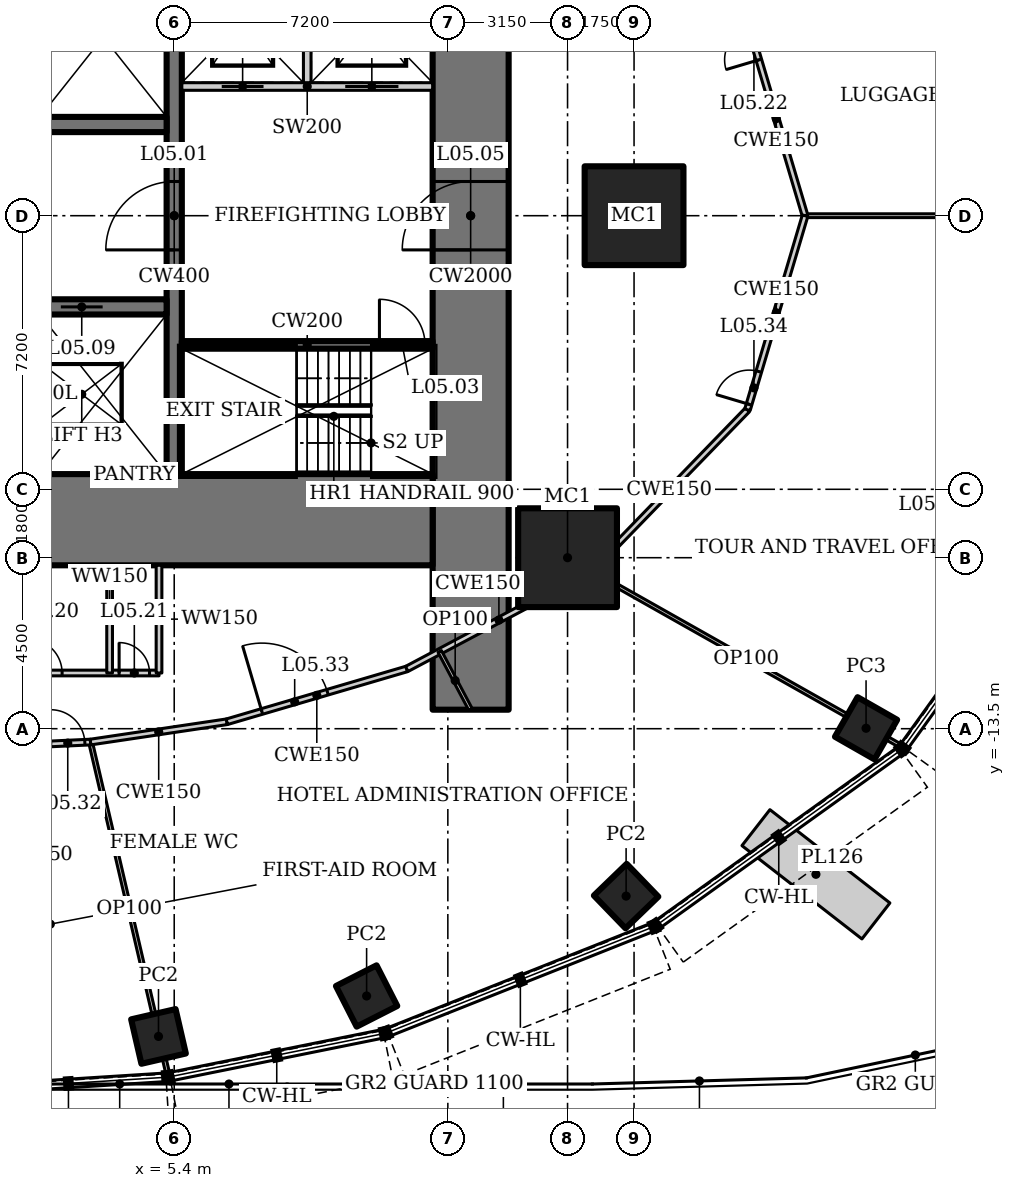
"""IFC4 building model, lengths in metres.
Left out: names, types, materials, properties, quantities, classifications, styles, units other than length and angle.
Written with IfcOpenShell. Run it as: python <this file> out.ifc"""

import sys

from ifc_helpers import new_model, si_unit, direction, frame, frame_2d, origin, origin_2d, place, context, subcontext, project, spatial, rectangle, hollow_rectangle, extrude, element, fill, save


model = new_model("IFC4")
c1 = context("Model", 3, precision=1e-05, world=origin(), true_north=direction((0.0, 1.0)))
c2 = subcontext(c1, "Body", "Model", "MODEL_VIEW")
j1 = project(units=[si_unit("LENGTHUNIT", "METRE"), si_unit("PLANEANGLEUNIT", "RADIAN")], contexts=[c1])
p1 = place(None, origin())
s1 = spatial("IfcSite", under=j1, at=p1, CompositionType="ELEMENT")
p2 = place(p1, origin())
s2 = spatial("IfcBuilding", under=s1, at=p2, CompositionType="ELEMENT")
p3 = place(p2, frame((0.0, 0.0, 32.0)))
s3 = spatial("IfcBuildingStorey", under=s2, at=p3, CompositionType="ELEMENT", Elevation=32.0)
for number, where, z_axis, x_axis in (
    (1, (17.5, 0.0, 0.0), (0.0, 0.0, 1.0), (1.0, 0.0, 0.0)),
    (2, (15.75, -9.0, 0.0), (0.0, 0.0, 1.0), (1.0, 0.0, 0.0)),
):
    element("IfcColumn", number, at=place(p3, frame(where, z_axis=z_axis, x_axis=x_axis)), inside=s3, PredefinedType="COLUMN", context=c2, shape_type="SweptSolid", body=[
        extrude(hollow_rectangle(XDim=2.6, YDim=2.6, WallThickness=0.13, at=origin_2d()), origin(), (0.0, 0.0, 1.0), 5.0),
    ])
for number, where, z_axis, x_axis in (
    (3, (4.986, -21.598, 0.0), (0.0, 0.0, 1.0), (0.974, 0.225, 0.0)),
    (4, (10.463, -20.534, 0.0), (0.0, 0.0, 1.0), (0.891, 0.454, 0.0)),
    (5, (17.291, -17.905, 0.0), (0.0, 0.0, 1.0), (0.719, 0.695, 0.0)),
):
    element("IfcColumn", number, at=place(p3, frame(where, z_axis=z_axis, x_axis=x_axis)), inside=s3, PredefinedType="COLUMN", context=c2, shape_type="SweptSolid", body=[
        extrude(hollow_rectangle(XDim=1.2, YDim=1.2, WallThickness=0.1, at=origin_2d()), origin(), (0.0, 0.0, 1.0), 5.0),
    ])
p4 = place(p3, frame((23.605, -13.489, 0.0), z_axis=(0.0, 0.0, 1.0), x_axis=(0.496139221777, 0.86824298017, 0.0)))
e6 = element("IfcColumn", 6, at=p4, inside=s3, PredefinedType="COLUMN", context=c2, shape_type="SweptSolid", body=[
    extrude(hollow_rectangle(XDim=1.2, YDim=1.2, WallThickness=0.12, at=origin_2d()), origin(), (0.0, 0.0, 1.0), 5.0),
])
p5 = place(p3, frame((13.2, -13.0, 0.0), z_axis=(0.0, 0.0, 1.0), x_axis=(0.0, 1.0, 0.0)))
e7 = element("IfcWall", 7, at=p5, inside=s3, PredefinedType="SHEAR", context=c2, shape_type="SweptSolid", body=[
    extrude(rectangle(XDim=26.0, YDim=2.0, at=frame_2d((13.0, 0.0))), origin(), (0.0, 0.0, 1.0), 5.0),
])
p6 = place(p5, frame((12.1, 0.0, 0.0)))
e8 = element("IfcOpeningElement", 8, at=p6, cuts=e7, PredefinedType="OPENING", context=c2, shape_type="SweptSolid", body=[
    extrude(rectangle(XDim=1.8, YDim=2.1, at=frame_2d((0.9, 1.05))), frame((0.0, 1.01, 0.0), z_axis=(0.0, -1.0, 0.0), x_axis=(1.0, 0.0, 0.0)), (0.0, 0.0, 1.0), 2.02),
])
p7 = place(p3, frame((-12.2, -8.0, 0.0), z_axis=(0.0, 0.0, 1.0), x_axis=(1.0, 0.0, 0.0)))
e9 = element("IfcWall", 9, at=p7, inside=s3, PredefinedType="SHEAR", context=c2, shape_type="SweptSolid", body=[
    extrude(rectangle(XDim=24.4, YDim=2.4, at=frame_2d((12.2, 0.0))), origin(), (0.0, 0.0, 1.0), 5.0),
])
p8 = place(p3, frame((5.4, -6.8, 0.0), z_axis=(0.0, 0.0, 1.0), x_axis=(0.0, 1.0, 0.0)))
e10 = element("IfcWall", 10, at=p8, inside=s3, PredefinedType="SHEAR", context=c2, shape_type="SweptSolid", body=[
    extrude(rectangle(XDim=13.6, YDim=0.4, at=frame_2d((6.8, 0.0))), origin(), (0.0, 0.0, 1.0), 5.0),
])
p9 = place(p8, frame((5.9, 0.0, 0.0)))
e11 = element("IfcOpeningElement", 11, at=p9, cuts=e10, PredefinedType="OPENING", context=c2, shape_type="SweptSolid", body=[
    extrude(rectangle(XDim=1.8, YDim=2.1, at=frame_2d((0.9, 1.05))), frame((0.0, 0.21, 0.0), z_axis=(0.0, -1.0, 0.0), x_axis=(1.0, 0.0, 0.0)), (0.0, 0.0, 1.0), 0.42),
])
p10 = place(p3, frame((-5.2, -2.4, 0.0), z_axis=(0.0, 0.0, 1.0), x_axis=(1.0, 0.0, 0.0)))
e12 = element("IfcWall", 12, at=p10, inside=s3, PredefinedType="SHEAR", context=c2, shape_type="SweptSolid", body=[
    extrude(rectangle(XDim=10.4, YDim=0.4, at=frame_2d((5.2, 0.0))), origin(), (0.0, 0.0, 1.0), 5.0),
])
p11 = place(p10, frame((0.55, 0.0, 0.0)))
e13 = element("IfcOpeningElement", 13, at=p11, cuts=e12, PredefinedType="OPENING", context=c2, shape_type="SweptSolid", body=[
    extrude(rectangle(XDim=1.1, YDim=2.2, at=frame_2d((0.55, 1.1))), frame((0.0, 0.21, 0.0), z_axis=(0.0, -1.0, 0.0), x_axis=(1.0, 0.0, 0.0)), (0.0, 0.0, 1.0), 0.42),
])
p12 = place(p10, frame((4.083, 0.0, 0.0)))
e14 = element("IfcOpeningElement", 14, at=p12, cuts=e12, PredefinedType="OPENING", context=c2, shape_type="SweptSolid", body=[
    extrude(rectangle(XDim=1.1, YDim=2.2, at=frame_2d((0.55, 1.1))), frame((0.0, 0.21, 0.0), z_axis=(0.0, -1.0, 0.0), x_axis=(1.0, 0.0, 0.0)), (0.0, 0.0, 1.0), 0.42),
])
p13 = place(p10, frame((7.617, 0.0, 0.0)))
e15 = element("IfcOpeningElement", 15, at=p13, cuts=e12, PredefinedType="OPENING", context=c2, shape_type="SweptSolid", body=[
    extrude(rectangle(XDim=1.1, YDim=2.2, at=frame_2d((0.55, 1.1))), frame((0.0, 0.21, 0.0), z_axis=(0.0, -1.0, 0.0), x_axis=(1.0, 0.0, 0.0)), (0.0, 0.0, 1.0), 0.42),
])
p14 = place(p3, frame((5.2, 2.4, 0.0), z_axis=(0.0, 0.0, 1.0), x_axis=(-1.0, 0.0, 0.0)))
e16 = element("IfcWall", 16, at=p14, inside=s3, PredefinedType="SHEAR", context=c2, shape_type="SweptSolid", body=[
    extrude(rectangle(XDim=10.4, YDim=0.4, at=frame_2d((5.2, 0.0))), origin(), (0.0, 0.0, 1.0), 5.0),
])
p15 = place(p3, frame((5.6, -3.4, 0.0), z_axis=(0.0, 0.0, 1.0), x_axis=(1.0, 0.0, 0.0)))
e17 = element("IfcWall", 17, at=p15, inside=s3, PredefinedType="SHEAR", context=c2, shape_type="SweptSolid", body=[
    extrude(rectangle(XDim=6.6, YDim=0.2, at=frame_2d((3.3, 0.0))), origin(), (0.0, 0.0, 1.0), 5.0),
])
p16 = place(p15, frame((5.2, 0.0, 0.0)))
e18 = element("IfcOpeningElement", 18, at=p16, cuts=e17, PredefinedType="OPENING", context=c2, shape_type="SweptSolid", body=[
    extrude(rectangle(XDim=1.2, YDim=2.1, at=frame_2d((0.6, 1.05))), frame((0.0, 0.11, 0.0), z_axis=(0.0, -1.0, 0.0), x_axis=(1.0, 0.0, 0.0)), (0.0, 0.0, 1.0), 0.22),
])
p17 = place(p3, frame((12.2, 3.4, 0.0), z_axis=(0.0, 0.0, 1.0), x_axis=(-1.0, 0.0, 0.0)))
e19 = element("IfcWall", 19, at=p17, inside=s3, PredefinedType="SOLIDWALL", context=c2, shape_type="SweptSolid", body=[
    extrude(rectangle(XDim=6.6, YDim=0.2, at=frame_2d((3.3, 0.0))), origin(), (0.0, 0.0, 1.0), 5.0),
])
p18 = place(p17, frame((4.45, 0.0, 0.0)))
e20 = element("IfcOpeningElement", 20, at=p18, cuts=e19, PredefinedType="OPENING", context=c2, shape_type="SweptSolid", body=[
    extrude(rectangle(XDim=1.1, YDim=2.2, at=frame_2d((0.55, 1.1))), frame((0.0, 0.11, 0.0), z_axis=(0.0, -1.0, 0.0), x_axis=(1.0, 0.0, 0.0)), (0.0, 0.0, 1.0), 0.22),
])
p19 = place(p17, frame((0.9, 0.0, 0.0)))
e21 = element("IfcOpeningElement", 21, at=p19, cuts=e19, PredefinedType="OPENING", context=c2, shape_type="SweptSolid", body=[
    extrude(rectangle(XDim=1.4, YDim=2.2, at=frame_2d((0.7, 1.1))), frame((0.0, 0.11, 0.0), z_axis=(0.0, -1.0, 0.0), x_axis=(1.0, 0.0, 0.0)), (0.0, 0.0, 1.0), 0.22),
])
p20 = place(p3, frame((8.9, 3.5, 0.0), z_axis=(0.0, 0.0, 1.0), x_axis=(0.0, 1.0, 0.0)))
e22 = element("IfcWall", 22, at=p20, inside=s3, PredefinedType="SOLIDWALL", context=c2, shape_type="SweptSolid", body=[
    extrude(rectangle(XDim=3.3, YDim=0.2, at=frame_2d((1.65, 0.0))), origin(), (0.0, 0.0, 1.0), 5.0),
])
p21 = place(p3, frame((20.707, -16.104, 0.0), z_axis=(0.0, 0.0, 1.0), x_axis=(0.789375220822, -0.613911036512, 0.0)))
e23 = element("IfcWall", 23, at=p21, inside=s3, PredefinedType="USERDEFINED", context=c2, shape_type="SweptSolid", body=[
    extrude(rectangle(XDim=4.0, YDim=1.2, at=frame_2d((2.0, 0.0))), origin(), (0.0, 0.0, 1.0), 0.6),
])
p22 = place(p3, frame((30.821, 0.0, 0.0), z_axis=(0.0, 0.0, 1.0), x_axis=(-1.0, 0.0, 0.0)))
e24 = element("IfcWall", 24, at=p22, inside=s3, PredefinedType="PARTITIONING", context=c2, shape_type="SweptSolid", body=[
    extrude(rectangle(XDim=8.821, YDim=0.1, at=frame_2d((4.41, 0.0))), origin(), (0.0, 0.0, 1.0), 3.928),
])
p23 = place(p3, frame((5.238, -22.613, 0.0), z_axis=(0.0, 0.0, 1.0), x_axis=(-0.226801487876, 0.97394100699, 0.0)))
e25 = element("IfcWall", 25, at=p23, inside=s3, PredefinedType="PARTITIONING", context=c2, shape_type="SweptSolid", body=[
    extrude(rectangle(XDim=8.996, YDim=0.1, at=frame_2d((4.498, 0.0))), origin(), (0.0, 0.0, 1.0), 4.167),
])
p24 = place(p3, frame((24.54, -13.968, 0.0), z_axis=(0.0, 0.0, 1.0), x_axis=(-0.870737709049, 0.491747742283, 0.0)))
e26 = element("IfcWall", 26, at=p24, inside=s3, PredefinedType="PARTITIONING", context=c2, shape_type="SweptSolid", body=[
    extrude(rectangle(XDim=9.384, YDim=0.1, at=frame_2d((4.692, 0.0))), origin(), (0.0, 0.0, 1.0), 4.093),
])
p25 = place(p3, frame((22.0, 0.0, 0.0), z_axis=(0.0, 0.0, 1.0), x_axis=(-0.284584469409, 0.95865096869, 0.0)))
e27 = element("IfcWall", 27, at=p25, inside=s3, PredefinedType="PARTITIONING", context=c2, shape_type="SweptSolid", body=[
    extrude(rectangle(XDim=5.327, YDim=0.15, at=frame_2d((2.664, 0.0))), origin(), (0.0, 0.0, 1.0), 4.85),
])
p26 = place(p25, frame((4.278, 0.0, 0.0)))
e28 = element("IfcOpeningElement", 28, at=p26, cuts=e27, PredefinedType="OPENING", context=c2, shape_type="SweptSolid", body=[
    extrude(rectangle(XDim=0.9, YDim=2.1, at=frame_2d((0.45, 1.05))), frame((0.0, 0.085, 0.0), z_axis=(0.0, -1.0, 0.0), x_axis=(1.0, 0.0, 0.0)), (0.0, 0.0, 1.0), 0.17),
])
p27 = place(p3, frame((0.0, -14.0, 0.0), z_axis=(0.0, 0.0, 1.0), x_axis=(0.998920826789, 0.046445471333, 0.0)))
e29 = element("IfcWall", 29, at=p27, inside=s3, PredefinedType="PARTITIONING", context=c2, shape_type="SweptSolid", body=[
    extrude(rectangle(XDim=3.201, YDim=0.15, at=frame_2d((1.601, 0.0))), origin(), (0.0, 0.0, 1.0), 4.85),
])
p28 = place(p27, frame((2.151, 0.0, 0.0)))
e30 = element("IfcOpeningElement", 30, at=p28, cuts=e29, PredefinedType="OPENING", context=c2, shape_type="SweptSolid", body=[
    extrude(rectangle(XDim=0.9, YDim=2.1, at=frame_2d((0.45, 1.05))), frame((0.0, 0.085, 0.0), z_axis=(0.0, -1.0, 0.0), x_axis=(1.0, 0.0, 0.0)), (0.0, 0.0, 1.0), 0.17),
])
p29 = place(p3, frame((3.198, -13.851, 0.0), z_axis=(0.0, 0.0, 1.0), x_axis=(0.989107488999, 0.14719502439, 0.0)))
e31 = element("IfcWall", 31, at=p29, inside=s3, PredefinedType="PARTITIONING", context=c2, shape_type="SweptSolid", body=[
    extrude(rectangle(XDim=3.627, YDim=0.15, at=frame_2d((1.814, 0.0))), origin(), (0.0, 0.0, 1.0), 4.85),
])
p30 = place(p3, frame((6.786, -13.317, 0.0), z_axis=(0.0, 0.0, 1.0), x_axis=(0.959496227294, 0.281721475589, 0.0)))
e32 = element("IfcWall", 32, at=p30, inside=s3, PredefinedType="PARTITIONING", context=c2, shape_type="SweptSolid", body=[
    extrude(rectangle(XDim=4.933, YDim=0.15, at=frame_2d((2.466, 0.0))), origin(), (0.0, 0.0, 1.0), 4.85),
])
p31 = place(p30, frame((0.959, 0.0, 0.0)))
e33 = element("IfcOpeningElement", 33, at=p31, cuts=e32, PredefinedType="OPENING", context=c2, shape_type="SweptSolid", body=[
    extrude(rectangle(XDim=1.8, YDim=2.1, at=frame_2d((0.9, 1.05))), frame((0.0, 0.085, 0.0), z_axis=(0.0, -1.0, 0.0), x_axis=(1.0, 0.0, 0.0)), (0.0, 0.0, 1.0), 0.17),
])
p32 = place(p3, frame((11.519, -11.928, 0.0), z_axis=(0.0, 0.0, 1.0), x_axis=(0.883334368785, 0.468743419071, 0.0)))
e34 = element("IfcWall", 34, at=p32, inside=s3, PredefinedType="PARTITIONING", context=c2, shape_type="SweptSolid", body=[
    extrude(rectangle(XDim=5.491, YDim=0.15, at=frame_2d((2.746, 0.0))), origin(), (0.0, 0.0, 1.0), 4.85),
])
p33 = place(p3, frame((16.369, -9.354, 0.0), z_axis=(0.0, 0.0, 1.0), x_axis=(0.695871090686, 0.71816671125, 0.0)))
e35 = element("IfcWall", 35, at=p33, inside=s3, PredefinedType="PARTITIONING", context=c2, shape_type="SweptSolid", body=[
    extrude(rectangle(XDim=5.913, YDim=0.15, at=frame_2d((2.957, 0.0))), origin(), (0.0, 0.0, 1.0), 4.85),
])
p34 = place(p3, frame((20.484, -5.107, 0.0), z_axis=(0.0, 0.0, 1.0), x_axis=(0.284584469409, 0.95865096869, 0.0)))
e36 = element("IfcWall", 36, at=p34, inside=s3, PredefinedType="PARTITIONING", context=c2, shape_type="SweptSolid", body=[
    extrude(rectangle(XDim=5.327, YDim=0.15, at=frame_2d((2.664, 0.0))), origin(), (0.0, 0.0, 1.0), 4.85),
])
p35 = place(p34, frame((0.15, 0.0, 0.0)))
e37 = element("IfcOpeningElement", 37, at=p35, cuts=e36, PredefinedType="OPENING", context=c2, shape_type="SweptSolid", body=[
    extrude(rectangle(XDim=0.9, YDim=2.1, at=frame_2d((0.45, 1.05))), frame((0.0, 0.085, 0.0), z_axis=(0.0, -1.0, 0.0), x_axis=(1.0, 0.0, 0.0)), (0.0, 0.0, 1.0), 0.17),
])
p36 = place(p3, frame((-5.0, -12.034, 0.0), z_axis=(0.0, 0.0, 1.0), x_axis=(1.0, 0.0, 0.0)))
e38 = element("IfcWall", 38, at=p36, inside=s3, PredefinedType="SOLIDWALL", context=c2, shape_type="SweptSolid", body=[
    extrude(rectangle(XDim=10.0, YDim=0.15, at=frame_2d((5.0, 0.0))), origin(), (0.0, 0.0, 1.0), 4.85),
])
p37 = place(p36, frame((0.45, 0.0, 0.0)))
e39 = element("IfcOpeningElement", 39, at=p37, cuts=e38, PredefinedType="OPENING", context=c2, shape_type="SweptSolid", body=[
    extrude(rectangle(XDim=1.0, YDim=2.1, at=frame_2d((0.5, 1.05))), frame((0.0, 0.085, 0.0), z_axis=(0.0, -1.0, 0.0), x_axis=(1.0, 0.0, 0.0)), (0.0, 0.0, 1.0), 0.17),
])
p38 = place(p36, frame((3.15, 0.0, 0.0)))
e40 = element("IfcOpeningElement", 40, at=p38, cuts=e38, PredefinedType="OPENING", context=c2, shape_type="SweptSolid", body=[
    extrude(rectangle(XDim=0.9, YDim=2.1, at=frame_2d((0.45, 1.05))), frame((0.0, 0.085, 0.0), z_axis=(0.0, -1.0, 0.0), x_axis=(1.0, 0.0, 0.0)), (0.0, 0.0, 1.0), 0.17),
])
p39 = place(p36, frame((6.55, 0.0, 0.0)))
e41 = element("IfcOpeningElement", 41, at=p39, cuts=e38, PredefinedType="OPENING", context=c2, shape_type="SweptSolid", body=[
    extrude(rectangle(XDim=0.9, YDim=2.1, at=frame_2d((0.45, 1.05))), frame((0.0, 0.085, 0.0), z_axis=(0.0, -1.0, 0.0), x_axis=(1.0, 0.0, 0.0)), (0.0, 0.0, 1.0), 0.17),
])
p40 = place(p36, frame((8.95, 0.0, 0.0)))
e42 = element("IfcOpeningElement", 42, at=p40, cuts=e38, PredefinedType="OPENING", context=c2, shape_type="SweptSolid", body=[
    extrude(rectangle(XDim=0.8, YDim=2.1, at=frame_2d((0.4, 1.05))), frame((0.0, 0.085, 0.0), z_axis=(0.0, -1.0, 0.0), x_axis=(1.0, 0.0, 0.0)), (0.0, 0.0, 1.0), 0.17),
])
for number, where, z_axis, x_axis in (
    (43, (5.0, -9.2, 0.0), (0.0, 0.0, 1.0), (0.0, -1.0, 0.0)),
    (44, (3.7, -9.2, 0.0), (0.0, 0.0, 1.0), (0.0, -1.0, 0.0)),
):
    element("IfcWall", number, at=place(p3, frame(where, z_axis=z_axis, x_axis=x_axis)), inside=s3, PredefinedType="SOLIDWALL", context=c2, shape_type="SweptSolid", body=[
        extrude(rectangle(XDim=2.834, YDim=0.15, at=frame_2d((1.417, 0.0))), origin(), (0.0, 0.0, 1.0), 4.85),
    ])
p41 = place(p3, frame((13.2, -13.0, 0.0), z_axis=(0.0, 0.0, 1.0), x_axis=(-0.46874717052, 0.88333237806, 0.0)))
e45 = element("IfcWall", 45, at=p41, inside=s3, PredefinedType="PARTITIONING", context=c2, shape_type="SweptSolid", body=[
    extrude(rectangle(XDim=1.735, YDim=0.1, at=frame_2d((0.868, 0.0))), origin(), (0.0, 0.0, 1.0), 4.85),
])
p42 = place(p9, origin())
e46 = element("IfcDoor", 46, at=p42, inside=s3, OperationType="DOUBLE_DOOR_DOUBLE_SWING", PredefinedType="DOOR", context=c2, shape_type="SweptSolid", body=[
    extrude(rectangle(XDim=1.8, YDim=2.1, at=frame_2d((0.9, 1.05))), frame((0.0, 0.025, 0.0), z_axis=(0.0, -1.0, 0.0), x_axis=(1.0, 0.0, 0.0)), (0.0, 0.0, 1.0), 0.05),
])
fill(e11, e46)
p43 = place(p16, origin())
e47 = element("IfcDoor", 47, at=p43, inside=s3, OperationType="SINGLE_SWING_RIGHT", PredefinedType="DOOR", context=c2, shape_type="SweptSolid", body=[
    extrude(rectangle(XDim=1.2, YDim=2.1, at=frame_2d((0.6, 1.05))), frame((0.0, 0.025, 0.0), z_axis=(0.0, -1.0, 0.0), x_axis=(1.0, 0.0, 0.0)), (0.0, 0.0, 1.0), 0.05),
])
fill(e18, e47)
p44 = place(p6, origin())
e48 = element("IfcDoor", 48, at=p44, inside=s3, OperationType="DOUBLE_DOOR_DOUBLE_SWING", PredefinedType="DOOR", context=c2, shape_type="SweptSolid", body=[
    extrude(rectangle(XDim=1.8, YDim=2.1, at=frame_2d((0.9, 1.05))), frame((0.0, 0.025, 0.0), z_axis=(0.0, -1.0, 0.0), x_axis=(1.0, 0.0, 0.0)), (0.0, 0.0, 1.0), 0.05),
])
fill(e8, e48)
p45 = place(p13, origin())
e49 = element("IfcDoor", 49, at=p45, inside=s3, OperationType="DOUBLE_DOOR_SLIDING", PredefinedType="DOOR", context=c2, shape_type="SweptSolid", body=[
    extrude(rectangle(XDim=1.1, YDim=2.2, at=frame_2d((0.55, 1.1))), frame((0.0, 0.025, 0.0), z_axis=(0.0, -1.0, 0.0), x_axis=(1.0, 0.0, 0.0)), (0.0, 0.0, 1.0), 0.05),
])
fill(e15, e49)
p46 = place(p18, origin())
e50 = element("IfcDoor", 50, at=p46, inside=s3, OperationType="DOUBLE_DOOR_SLIDING", PredefinedType="DOOR", context=c2, shape_type="SweptSolid", body=[
    extrude(rectangle(XDim=1.1, YDim=2.2, at=frame_2d((0.55, 1.1))), frame((0.0, 0.025, 0.0), z_axis=(0.0, -1.0, 0.0), x_axis=(1.0, 0.0, 0.0)), (0.0, 0.0, 1.0), 0.05),
])
fill(e20, e50)
p47 = place(p19, origin())
e51 = element("IfcDoor", 51, at=p47, inside=s3, OperationType="DOUBLE_DOOR_SLIDING", PredefinedType="DOOR", context=c2, shape_type="SweptSolid", body=[
    extrude(rectangle(XDim=1.4, YDim=2.2, at=frame_2d((0.7, 1.1))), frame((0.0, 0.025, 0.0), z_axis=(0.0, -1.0, 0.0), x_axis=(1.0, 0.0, 0.0)), (0.0, 0.0, 1.0), 0.05),
])
fill(e21, e51)
p48 = place(p39, origin())
e52 = element("IfcDoor", 52, at=p48, inside=s3, OperationType="SINGLE_SWING_LEFT", PredefinedType="DOOR", context=c2, shape_type="SweptSolid", body=[
    extrude(rectangle(XDim=0.9, YDim=2.1, at=frame_2d((0.45, 1.05))), frame((0.0, 0.025, 0.0), z_axis=(0.0, -1.0, 0.0), x_axis=(1.0, 0.0, 0.0)), (0.0, 0.0, 1.0), 0.05),
])
fill(e41, e52)
p49 = place(p40, origin())
e53 = element("IfcDoor", 53, at=p49, inside=s3, OperationType="SINGLE_SWING_LEFT", PredefinedType="DOOR", context=c2, shape_type="SweptSolid", body=[
    extrude(rectangle(XDim=0.8, YDim=2.1, at=frame_2d((0.4, 1.05))), frame((0.0, 0.025, 0.0), z_axis=(0.0, -1.0, 0.0), x_axis=(1.0, 0.0, 0.0)), (0.0, 0.0, 1.0), 0.05),
])
fill(e42, e53)
p50 = place(p26, origin())
e54 = element("IfcDoor", 54, at=p50, inside=s3, OperationType="SINGLE_SWING_LEFT", PredefinedType="DOOR", context=c2, shape_type="SweptSolid", body=[
    extrude(rectangle(XDim=0.9, YDim=2.1, at=frame_2d((0.45, 1.05))), frame((0.0, 0.025, 0.0), z_axis=(0.0, -1.0, 0.0), x_axis=(1.0, 0.0, 0.0)), (0.0, 0.0, 1.0), 0.05),
])
fill(e28, e54)
p51 = place(p28, origin())
e55 = element("IfcDoor", 55, at=p51, inside=s3, OperationType="SINGLE_SWING_LEFT", PredefinedType="DOOR", context=c2, shape_type="SweptSolid", body=[
    extrude(rectangle(XDim=0.9, YDim=2.1, at=frame_2d((0.45, 1.05))), frame((0.0, 0.025, 0.0), z_axis=(0.0, -1.0, 0.0), x_axis=(1.0, 0.0, 0.0)), (0.0, 0.0, 1.0), 0.05),
])
fill(e30, e55)
p52 = place(p31, origin())
e56 = element("IfcDoor", 56, at=p52, inside=s3, OperationType="DOUBLE_DOOR_DOUBLE_SWING", PredefinedType="DOOR", context=c2, shape_type="SweptSolid", body=[
    extrude(rectangle(XDim=1.8, YDim=2.1, at=frame_2d((0.9, 1.05))), frame((0.0, 0.025, 0.0), z_axis=(0.0, -1.0, 0.0), x_axis=(1.0, 0.0, 0.0)), (0.0, 0.0, 1.0), 0.05),
])
fill(e33, e56)
p53 = place(p35, origin())
e57 = element("IfcDoor", 57, at=p53, inside=s3, OperationType="SINGLE_SWING_LEFT", PredefinedType="DOOR", context=c2, shape_type="SweptSolid", body=[
    extrude(rectangle(XDim=0.9, YDim=2.1, at=frame_2d((0.45, 1.05))), frame((0.0, 0.025, 0.0), z_axis=(0.0, -1.0, 0.0), x_axis=(1.0, 0.0, 0.0)), (0.0, 0.0, 1.0), 0.05),
])
fill(e37, e57)
save(model, sys.argv[1])
